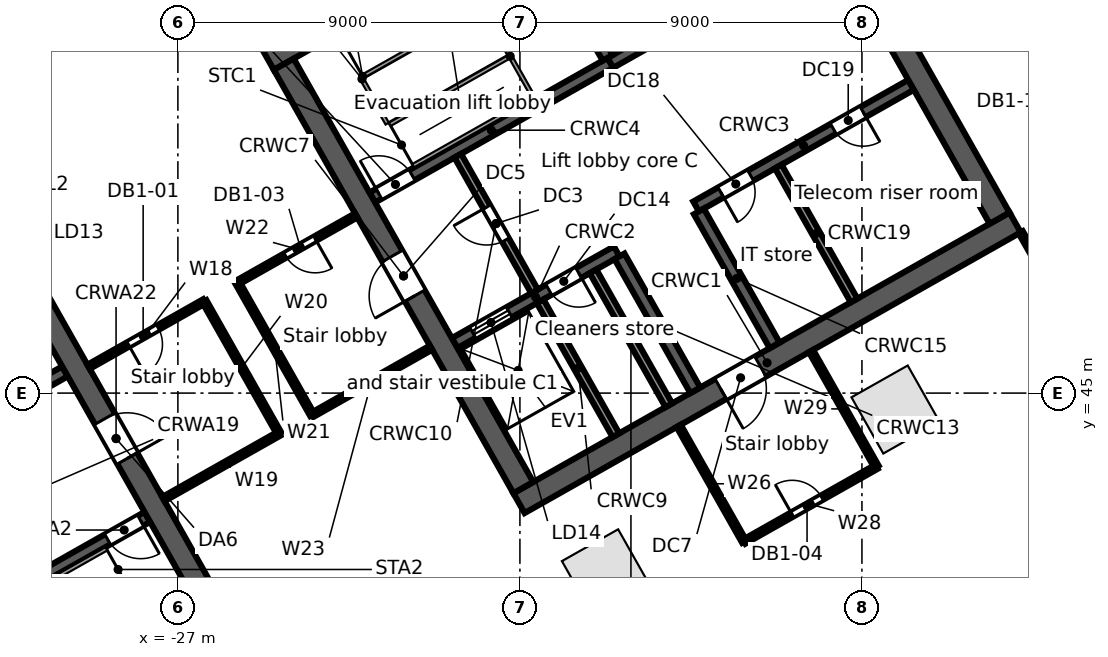
"""IFC4 building model, lengths in metres.
Left out: names, types, materials, properties, quantities, classifications, styles, units other than length and angle.
Written with IfcOpenShell. Run it as: python <this file> out.ifc"""

import sys

from ifc_helpers import new_model, si_unit, direction, frame, frame_2d, origin, origin_2d, place, context, subcontext, project, spatial, rectangle, extrude, element, fill, save


model = new_model("IFC4")
c1 = context("Model", 3, precision=1e-05, world=origin(), true_north=direction((0.0, 1.0)))
c2 = subcontext(c1, "Body", "Model", "MODEL_VIEW")
j1 = project(units=[si_unit("LENGTHUNIT", "METRE"), si_unit("PLANEANGLEUNIT", "RADIAN")], contexts=[c1])
p1 = place(None, origin())
s1 = spatial("IfcSite", under=j1, at=p1, CompositionType="ELEMENT")
p2 = place(p1, origin())
s2 = spatial("IfcBuilding", under=s1, at=p2, CompositionType="ELEMENT")
p3 = place(p2, frame((0.0, 0.0, -4.8)))
s3 = spatial("IfcBuildingStorey", under=s2, at=p3, CompositionType="ELEMENT", Elevation=-4.8)
p4 = place(p3, frame((-5.971, 78.503, 0.0), z_axis=(0.0, 0.0, 1.0), x_axis=(-0.870356741611, -0.492421711882, 0.0)))
e1 = element("IfcWall", 1, at=p4, inside=s3, PredefinedType="SOLIDWALL", context=c2, shape_type="SweptSolid", body=[
    extrude(rectangle(XDim=70.604, YDim=0.8, at=frame_2d((35.302, 0.0))), origin(), (0.0, 0.0, 1.0), 4.8),
])
for number, where, z_axis, x_axis in (
    (2, (-15.736, 40.257, 0.0), (0.0, 0.0, 1.0), (0.87, 0.492, 0.0)),
    (3, (-8.117, 44.568, 0.0), (0.0, 0.0, 1.0), (0.87, 0.492, 0.0)),
):
    element("IfcColumn", number, at=place(p3, frame(where, z_axis=z_axis, x_axis=x_axis)), inside=s3, PredefinedType="COLUMN", context=c2, shape_type="SweptSolid", body=[
        extrude(rectangle(XDim=1.7, YDim=1.7, at=origin_2d()), origin(), (0.0, 0.0, 1.0), 4.8),
    ])
p5 = place(p3, frame((-34.245, 38.097, 0.0), z_axis=(0.0, 0.0, 1.0), x_axis=(0.870364910201, 0.492407273597, 0.0)))
e4 = element("IfcWall", 4, at=p5, inside=s3, PredefinedType="SOLIDWALL", context=c2, shape_type="SweptSolid", body=[
    extrude(rectangle(XDim=7.4, YDim=0.3, at=frame_2d((3.7, 0.0))), origin(), (0.0, 0.0, 1.0), 4.35),
])
p6 = place(p5, frame((6.2, 0.0, 0.0)))
e5 = element("IfcOpeningElement", 5, at=p6, cuts=e4, PredefinedType="OPENING", context=c2, shape_type="SweptSolid", body=[
    extrude(rectangle(XDim=1.0, YDim=2.1, at=frame_2d((0.5, 1.05))), frame((0.0, 0.16, 0.0), z_axis=(0.0, -1.0, 0.0), x_axis=(1.0, 0.0, 0.0)), (0.0, 0.0, 1.0), 0.32),
])
p7 = place(p3, frame((-37.282, 41.435, 0.0), z_axis=(0.0, 0.0, 1.0), x_axis=(0.870356516133, 0.492422110414, 0.0)))
e6 = element("IfcWall", 6, at=p7, inside=s3, PredefinedType="SOLIDWALL", context=c2, shape_type="SweptSolid", body=[
    extrude(rectangle(XDim=8.4, YDim=0.3, at=frame_2d((4.2, 0.0))), origin(), (0.0, 0.0, 1.0), 4.35),
])
p8 = place(p7, frame((6.2, 0.0, 0.0)))
e7 = element("IfcOpeningElement", 7, at=p8, cuts=e6, PredefinedType="OPENING", context=c2, shape_type="SweptSolid", body=[
    extrude(rectangle(XDim=1.1, YDim=2.1, at=frame_2d((0.55, 1.05))), frame((0.0, 0.16, 0.0), z_axis=(0.0, -1.0, 0.0), x_axis=(1.0, 0.0, 0.0)), (0.0, 0.0, 1.0), 0.32),
])
p9 = place(p7, frame((1.55, 0.0, 0.0)))
e8 = element("IfcOpeningElement", 8, at=p9, cuts=e6, PredefinedType="OPENING", context=c2, shape_type="SweptSolid", body=[
    extrude(rectangle(XDim=0.9, YDim=2.1, at=frame_2d((0.45, 1.05))), frame((0.0, 0.16, 0.0), z_axis=(0.0, -1.0, 0.0), x_axis=(1.0, 0.0, 0.0)), (0.0, 0.0, 1.0), 0.32),
])
p10 = place(p3, frame((-31.778, 49.374, 0.0), z_axis=(0.0, 0.0, 1.0), x_axis=(0.492433046652, -0.870350328641, 0.0)))
e9 = element("IfcWall", 9, at=p10, inside=s3, PredefinedType="SOLIDWALL", context=c2, shape_type="SweptSolid", body=[
    extrude(rectangle(XDim=12.8, YDim=0.6, at=frame_2d((6.4, 0.0))), origin(), (0.0, 0.0, 1.0), 4.35),
])
p11 = place(p10, frame((5.8, 0.0, 0.0)))
e10 = element("IfcOpeningElement", 10, at=p11, cuts=e9, PredefinedType="OPENING", context=c2, shape_type="SweptSolid", body=[
    extrude(rectangle(XDim=1.2, YDim=2.1, at=frame_2d((0.6, 1.05))), frame((0.0, 0.31, 0.0), z_axis=(0.0, -1.0, 0.0), x_axis=(1.0, 0.0, 0.0)), (0.0, 0.0, 1.0), 0.62),
])
p12 = place(p3, frame((-18.024, 42.104, 0.0), z_axis=(0.0, 0.0, 1.0), x_axis=(0.870360574057, 0.492414937962, 0.0)))
e11 = element("IfcWall", 11, at=p12, inside=s3, PredefinedType="SOLIDWALL", context=c2, shape_type="SweptSolid", body=[
    extrude(rectangle(XDim=15.0, YDim=0.6, at=frame_2d((7.5, 0.0))), origin(), (0.0, 0.0, 1.0), 4.35),
])
p13 = place(p12, frame((6.1, 0.0, 0.0)))
e12 = element("IfcOpeningElement", 12, at=p13, cuts=e11, PredefinedType="OPENING", context=c2, shape_type="SweptSolid", body=[
    extrude(rectangle(XDim=1.2, YDim=2.1, at=frame_2d((0.6, 1.05))), frame((0.0, 0.31, 0.0), z_axis=(0.0, -1.0, 0.0), x_axis=(1.0, 0.0, 0.0)), (0.0, 0.0, 1.0), 0.62),
])
p14 = place(p3, frame((-19.718, 46.316, 0.0), z_axis=(0.0, 0.0, 1.0), x_axis=(0.870353963862, 0.492426621528, 0.0)))
e13 = element("IfcWall", 13, at=p14, inside=s3, PredefinedType="SOLIDWALL", context=c2, shape_type="SweptSolid", body=[
    extrude(rectangle(XDim=4.9, YDim=0.3, at=frame_2d((2.45, 0.0))), origin(), (0.0, 0.0, 1.0), 4.35),
])
p15 = place(p14, frame((0.55, 0.0, 0.0)))
e14 = element("IfcOpeningElement", 14, at=p15, cuts=e13, PredefinedType="OPENING", context=c2, shape_type="SweptSolid", body=[
    extrude(rectangle(XDim=1.1, YDim=2.1, at=frame_2d((0.55, 1.05))), frame((0.0, 0.16, 0.0), z_axis=(0.0, -1.0, 0.0), x_axis=(1.0, 0.0, 0.0)), (0.0, 0.0, 1.0), 0.32),
])
p16 = place(p14, frame((2.85, 0.0, 0.0)))
e15 = element("IfcOpeningElement", 15, at=p16, cuts=e13, PredefinedType="OPENING", context=c2, shape_type="SweptSolid", body=[
    extrude(rectangle(XDim=0.9, YDim=2.1, at=frame_2d((0.45, 1.05))), frame((0.0, 0.16, 0.0), z_axis=(0.0, -1.0, 0.0), x_axis=(1.0, 0.0, 0.0)), (0.0, 0.0, 1.0), 0.32),
])
p17 = place(p3, frame((-13.365, 49.911, 0.0), z_axis=(0.0, 0.0, 1.0), x_axis=(0.870340995471, 0.49244954219, 0.0)))
e16 = element("IfcWall", 16, at=p17, inside=s3, PredefinedType="SOLIDWALL", context=c2, shape_type="SweptSolid", body=[
    extrude(rectangle(XDim=6.5, YDim=0.3, at=frame_2d((3.25, 0.0))), origin(), (0.0, 0.0, 1.0), 4.35),
])
p18 = place(p17, frame((0.75, 0.0, 0.0)))
e17 = element("IfcOpeningElement", 17, at=p18, cuts=e16, PredefinedType="OPENING", context=c2, shape_type="SweptSolid", body=[
    extrude(rectangle(XDim=0.9, YDim=2.1, at=frame_2d((0.45, 1.05))), frame((0.0, 0.16, 0.0), z_axis=(0.0, -1.0, 0.0), x_axis=(1.0, 0.0, 0.0)), (0.0, 0.0, 1.0), 0.32),
])
p19 = place(p17, frame((4.15, 0.0, 0.0)))
e18 = element("IfcOpeningElement", 18, at=p19, cuts=e16, PredefinedType="OPENING", context=c2, shape_type="SweptSolid", body=[
    extrude(rectangle(XDim=0.9, YDim=2.1, at=frame_2d((0.45, 1.05))), frame((0.0, 0.16, 0.0), z_axis=(0.0, -1.0, 0.0), x_axis=(1.0, 0.0, 0.0)), (0.0, 0.0, 1.0), 0.32),
])
p20 = place(p3, frame((-21.885, 50.146, 0.0), z_axis=(0.0, 0.0, 1.0), x_axis=(0.870359411463, 0.492416992881, 0.0)))
e19 = element("IfcWall", 19, at=p20, inside=s3, PredefinedType="SOLIDWALL", context=c2, shape_type="SweptSolid", body=[
    extrude(rectangle(XDim=7.2, YDim=0.3, at=frame_2d((3.6, 0.0))), origin(), (0.0, 0.0, 1.0), 4.35),
])
p21 = place(p20, frame((0.2, 0.0, 0.0)))
e20 = element("IfcOpeningElement", 20, at=p21, cuts=e19, PredefinedType="OPENING", context=c2, shape_type="SweptSolid", body=[
    extrude(rectangle(XDim=1.0, YDim=2.1, at=frame_2d((0.5, 1.05))), frame((0.0, 0.16, 0.0), z_axis=(0.0, -1.0, 0.0), x_axis=(1.0, 0.0, 0.0)), (0.0, 0.0, 1.0), 0.32),
])
p22 = place(p3, frame((-15.618, 53.691, 0.0), z_axis=(0.0, 0.0, 1.0), x_axis=(0.870356769198, 0.492421663121, 0.0)))
e21 = element("IfcWall", 21, at=p22, inside=s3, PredefinedType="SOLIDWALL", context=c2, shape_type="SweptSolid", body=[
    extrude(rectangle(XDim=6.6, YDim=0.3, at=frame_2d((3.3, 0.0))), origin(), (0.0, 0.0, 1.0), 4.35),
])
p23 = place(p22, frame((2.6, 0.0, 0.0)))
e22 = element("IfcOpeningElement", 22, at=p23, cuts=e21, PredefinedType="OPENING", context=c2, shape_type="SweptSolid", body=[
    extrude(rectangle(XDim=0.9, YDim=2.1, at=frame_2d((0.45, 1.05))), frame((0.0, 0.16, 0.0), z_axis=(0.0, -1.0, 0.0), x_axis=(1.0, 0.0, 0.0)), (0.0, 0.0, 1.0), 0.32),
])
p24 = place(p3, frame((-24.623, 53.767, 0.0), z_axis=(0.0, 0.0, 1.0), x_axis=(0.870356627484, 0.492421913601, 0.0)))
e23 = element("IfcWall", 23, at=p24, inside=s3, PredefinedType="SOLIDWALL", context=c2, shape_type="SweptSolid", body=[
    extrude(rectangle(XDim=15.0, YDim=0.6, at=frame_2d((7.5, 0.0))), origin(), (0.0, 0.0, 1.0), 4.35),
])
p25 = place(p3, frame((-24.214, 53.654, 0.0), z_axis=(0.0, 0.0, 1.0), x_axis=(0.492441221355, -0.870345703448, 0.0)))
e24 = element("IfcWall", 24, at=p25, inside=s3, PredefinedType="SOLIDWALL", context=c2, shape_type="SweptSolid", body=[
    extrude(rectangle(XDim=12.8, YDim=0.6, at=frame_2d((6.4, 0.0))), origin(), (0.0, 0.0, 1.0), 4.35),
])
p26 = place(p25, frame((5.8, 0.0, 0.0)))
e25 = element("IfcOpeningElement", 25, at=p26, cuts=e24, PredefinedType="OPENING", context=c2, shape_type="SweptSolid", body=[
    extrude(rectangle(XDim=1.2, YDim=2.1, at=frame_2d((0.6, 1.05))), frame((0.0, 0.31, 0.0), z_axis=(0.0, -1.0, 0.0), x_axis=(1.0, 0.0, 0.0)), (0.0, 0.0, 1.0), 0.62),
])
p27 = place(p3, frame((-17.469, 47.417, 0.0), z_axis=(0.0, 0.0, 1.0), x_axis=(0.492440575896, -0.870346068648, 0.0)))
e26 = element("IfcWall", 26, at=p27, inside=s3, PredefinedType="SOLIDWALL", context=c2, shape_type="SweptSolid", body=[
    extrude(rectangle(XDim=4.05, YDim=0.2, at=frame_2d((2.025, 0.0))), origin(), (0.0, 0.0, 1.0), 4.35),
])
p28 = place(p3, frame((-19.635, 51.246, 0.0), z_axis=(0.0, 0.0, 1.0), x_axis=(0.492408451753, -0.87036424366, 0.0)))
e27 = element("IfcWall", 27, at=p28, inside=s3, PredefinedType="PARTITIONING", context=c2, shape_type="SweptSolid", body=[
    extrude(rectangle(XDim=4.1, YDim=0.2, at=frame_2d((2.05, 0.0))), origin(), (0.0, 0.0, 1.0), 4.35),
])
p29 = place(p28, frame((1.55, 0.0, 0.0)))
e28 = element("IfcOpeningElement", 28, at=p29, cuts=e27, PredefinedType="OPENING", context=c2, shape_type="SweptSolid", body=[
    extrude(rectangle(XDim=1.0, YDim=2.1, at=frame_2d((0.5, 1.05))), frame((0.0, 0.11, 0.0), z_axis=(0.0, -1.0, 0.0), x_axis=(1.0, 0.0, 0.0)), (0.0, 0.0, 1.0), 0.22),
])
p30 = place(p3, frame((-16.076, 48.205, 0.0), z_axis=(0.0, 0.0, 1.0), x_axis=(0.492394910396, -0.870371904542, 0.0)))
e29 = element("IfcWall", 29, at=p30, inside=s3, PredefinedType="SOLIDWALL", context=c2, shape_type="SweptSolid", body=[
    extrude(rectangle(XDim=4.05, YDim=0.2, at=frame_2d((2.025, 0.0))), origin(), (0.0, 0.0, 1.0), 4.35),
])
p31 = place(p3, frame((-15.379, 48.599, 0.0), z_axis=(0.0, 0.0, 1.0), x_axis=(0.492394910396, -0.870371904542, 0.0)))
e30 = element("IfcWall", 30, at=p31, inside=s3, PredefinedType="SOLIDWALL", context=c2, shape_type="SweptSolid", body=[
    extrude(rectangle(XDim=4.05, YDim=0.3, at=frame_2d((2.025, 0.0))), origin(), (0.0, 0.0, 1.0), 4.35),
])
p32 = place(p3, frame((-17.686, 57.347, 0.0), z_axis=(0.0, 0.0, 1.0), x_axis=(0.492420746998, -0.870357287513, 0.0)))
e31 = element("IfcWall", 31, at=p32, inside=s3, PredefinedType="SOLIDWALL", context=c2, shape_type="SweptSolid", body=[
    extrude(rectangle(XDim=4.05, YDim=0.3, at=frame_2d((2.025, 0.0))), origin(), (0.0, 0.0, 1.0), 4.35),
])
p33 = place(p3, frame((-13.291, 49.781, 0.0), z_axis=(0.0, 0.0, 1.0), x_axis=(0.492394910396, -0.870371904542, 0.0)))
e32 = element("IfcWall", 32, at=p33, inside=s3, PredefinedType="SOLIDWALL", context=c2, shape_type="SweptSolid", body=[
    extrude(rectangle(XDim=4.05, YDim=0.3, at=frame_2d((2.025, 0.0))), origin(), (0.0, 0.0, 1.0), 4.35),
])
p34 = place(p3, frame((-11.202, 50.962, 0.0), z_axis=(0.0, 0.0, 1.0), x_axis=(0.49241474071, -0.870360685654, 0.0)))
e33 = element("IfcWall", 33, at=p34, inside=s3, PredefinedType="PARTITIONING", context=c2, shape_type="SweptSolid", body=[
    extrude(rectangle(XDim=4.05, YDim=0.2, at=frame_2d((2.025, 0.0))), origin(), (0.0, 0.0, 1.0), 4.35),
])
p35 = place(p3, frame((-11.681, 60.744, 0.0), z_axis=(0.0, 0.0, 1.0), x_axis=(0.492426772896, -0.870353878221, 0.0)))
e34 = element("IfcWall", 34, at=p35, inside=s3, PredefinedType="SOLIDWALL", context=c2, shape_type="SweptSolid", body=[
    extrude(rectangle(XDim=12.8, YDim=0.6, at=frame_2d((6.4, 0.0))), origin(), (0.0, 0.0, 1.0), 4.35),
])
p36 = place(p3, frame((-29.35, 45.692, 0.0), z_axis=(0.0, 0.0, 1.0), x_axis=(0.870270394775, 0.492574298942, 0.0)))
e35 = element("IfcWall", 35, at=p36, inside=s3, PredefinedType="PARTITIONING", context=c2, shape_type="SweptSolid", body=[
    extrude(rectangle(XDim=3.5, YDim=0.125, at=frame_2d((1.75, 0.0))), origin(), (0.0, 0.0, 1.0), 4.35),
])
p37 = place(p36, frame((1.2, 0.0, 0.0)))
e36 = element("IfcOpeningElement", 36, at=p37, cuts=e35, PredefinedType="OPENING", context=c2, shape_type="SweptSolid", body=[
    extrude(rectangle(XDim=0.9, YDim=2.1, at=frame_2d((0.45, 1.05))), frame((0.0, 0.073, 0.0), z_axis=(0.0, -1.0, 0.0), x_axis=(1.0, 0.0, 0.0)), (0.0, 0.0, 1.0), 0.145),
])
p38 = place(p3, frame((-27.381, 42.211, 0.0), z_axis=(0.0, 0.0, 1.0), x_axis=(0.870457605386, 0.492243392262, 0.0)))
e37 = element("IfcWall", 37, at=p38, inside=s3, PredefinedType="PARTITIONING", context=c2, shape_type="SweptSolid", body=[
    extrude(rectangle(XDim=3.5, YDim=0.125, at=frame_2d((1.75, 0.0))), origin(), (0.0, 0.0, 1.0), 3.43),
])
p39 = place(p3, frame((-26.304, 47.416, 0.0), z_axis=(0.0, 0.0, 1.0), x_axis=(0.492421185685, -0.870357039317, 0.0)))
e38 = element("IfcWall", 38, at=p39, inside=s3, PredefinedType="PARTITIONING", context=c2, shape_type="SweptSolid", body=[
    extrude(rectangle(XDim=4.0, YDim=0.125, at=frame_2d((2.0, 0.0))), origin(), (0.0, 0.0, 1.0), 3.412),
])
p40 = place(p3, frame((-25.434, 47.908, 0.0), z_axis=(0.0, 0.0, 1.0), x_axis=(0.492525823506, -0.870297830159, 0.0)))
e39 = element("IfcWall", 39, at=p40, inside=s3, PredefinedType="PARTITIONING", context=c2, shape_type="SweptSolid", body=[
    extrude(rectangle(XDim=4.0, YDim=0.125, at=frame_2d((2.0, 0.0))), origin(), (0.0, 0.0, 1.0), 3.412),
])
p41 = place(p3, frame((-25.434, 47.908, 0.0), z_axis=(0.0, 0.0, 1.0), x_axis=(0.870352535776, 0.492429145632, 0.0)))
e40 = element("IfcWall", 40, at=p41, inside=s3, PredefinedType="PARTITIONING", context=c2, shape_type="SweptSolid", body=[
    extrude(rectangle(XDim=3.591, YDim=0.125, at=frame_2d((1.795, 0.0))), origin(), (0.0, 0.0, 1.0), 3.412),
])
p42 = place(p41, frame((1.45, 0.0, 0.0)))
e41 = element("IfcOpeningElement", 41, at=p42, cuts=e40, PredefinedType="OPENING", context=c2, shape_type="SweptSolid", body=[
    extrude(rectangle(XDim=0.9, YDim=2.1, at=frame_2d((0.45, 1.05))), frame((0.0, 0.073, 0.0), z_axis=(0.0, -1.0, 0.0), x_axis=(1.0, 0.0, 0.0)), (0.0, 0.0, 1.0), 0.145),
])
p43 = place(p3, frame((-23.464, 44.427, 0.0), z_axis=(0.0, 0.0, 1.0), x_axis=(0.870352535776, 0.492429145632, 0.0)))
e42 = element("IfcWall", 42, at=p43, inside=s3, PredefinedType="PARTITIONING", context=c2, shape_type="SweptSolid", body=[
    extrude(rectangle(XDim=3.591, YDim=0.125, at=frame_2d((1.795, 0.0))), origin(), (0.0, 0.0, 1.0), 4.35),
])
p44 = place(p3, frame((-13.822, 44.137, 0.0), z_axis=(0.0, 0.0, 1.0), x_axis=(0.492604200384, -0.870253469837, 0.0)))
e43 = element("IfcWall", 43, at=p44, inside=s3, PredefinedType="PARTITIONING", context=c2, shape_type="SweptSolid", body=[
    extrude(rectangle(XDim=3.5, YDim=0.125, at=frame_2d((1.75, 0.0))), origin(), (0.0, 0.0, 1.0), 3.63),
])
p45 = place(p3, frame((-12.098, 41.091, 0.0), z_axis=(0.0, 0.0, 1.0), x_axis=(0.870297830159, 0.492525823506, 0.0)))
e44 = element("IfcWall", 44, at=p45, inside=s3, PredefinedType="PARTITIONING", context=c2, shape_type="SweptSolid", body=[
    extrude(rectangle(XDim=4.0, YDim=0.125, at=frame_2d((2.0, 0.0))), origin(), (0.0, 0.0, 1.0), 3.724),
])
p46 = place(p45, frame((1.45, 0.0, 0.0)))
e45 = element("IfcOpeningElement", 45, at=p46, cuts=e44, PredefinedType="OPENING", context=c2, shape_type="SweptSolid", body=[
    extrude(rectangle(XDim=0.9, YDim=2.1, at=frame_2d((0.45, 1.05))), frame((0.0, 0.073, 0.0), z_axis=(0.0, -1.0, 0.0), x_axis=(1.0, 0.0, 0.0)), (0.0, 0.0, 1.0), 0.145),
])
p47 = place(p3, frame((-10.34, 46.107, 0.0), z_axis=(0.0, 0.0, 1.0), x_axis=(0.492392845909, -0.87037307248, 0.0)))
e46 = element("IfcWall", 46, at=p47, inside=s3, PredefinedType="PARTITIONING", context=c2, shape_type="SweptSolid", body=[
    extrude(rectangle(XDim=3.5, YDim=0.125, at=frame_2d((1.75, 0.0))), origin(), (0.0, 0.0, 1.0), 3.63),
])
p48 = place(p3, frame((-5.301, 57.001, 0.0), z_axis=(0.0, 0.0, 1.0), x_axis=(0.487215056149, -0.873282021492, 0.0)))
e47 = element("IfcWall", 47, at=p48, inside=s3, PredefinedType="PARTITIONING", context=c2, shape_type="SweptSolid", body=[
    extrude(rectangle(XDim=8.395, YDim=0.125, at=frame_2d((4.197, 0.0))), origin(), (0.0, 0.0, 1.0), 4.35),
])
p49 = place(p48, frame((3.7, 0.0, 0.0)))
e48 = element("IfcOpeningElement", 48, at=p49, cuts=e47, PredefinedType="OPENING", context=c2, shape_type="SweptSolid", body=[
    extrude(rectangle(XDim=0.9, YDim=2.1, at=frame_2d((0.45, 1.05))), frame((0.0, 0.073, 0.0), z_axis=(0.0, -1.0, 0.0), x_axis=(1.0, 0.0, 0.0)), (0.0, 0.0, 1.0), 0.145),
])
p50 = place(p3, frame((-4.821, 49.23, 0.0), z_axis=(0.0, 0.0, 1.0), x_axis=(0.494232133704, -0.869329970733, 0.0)))
e49 = element("IfcWall", 49, at=p50, inside=s3, PredefinedType="PARTITIONING", context=c2, shape_type="SweptSolid", body=[
    extrude(rectangle(XDim=9.755, YDim=0.125, at=frame_2d((4.877, 0.0))), origin(), (0.0, 0.0, 1.0), 3.63),
])
p51 = place(p6, frame((1.0, 0.0, 0.0), z_axis=(0.0, 0.0, 1.0), x_axis=(-1.0, 0.0, 0.0)))
e50 = element("IfcDoor", 50, at=p51, inside=s3, OperationType="SINGLE_SWING_LEFT", PredefinedType="DOOR", context=c2, shape_type="SweptSolid", body=[
    extrude(rectangle(XDim=1.0, YDim=2.1, at=frame_2d((0.5, 1.05))), frame((0.0, 0.025, 0.0), z_axis=(0.0, -1.0, 0.0), x_axis=(1.0, 0.0, 0.0)), (0.0, 0.0, 1.0), 0.05),
])
fill(e5, e50)
p52 = place(p11, origin())
e51 = element("IfcDoor", 51, at=p52, inside=s3, OperationType="SINGLE_SWING_RIGHT", PredefinedType="DOOR", context=c2, shape_type="SweptSolid", body=[
    extrude(rectangle(XDim=1.2, YDim=2.1, at=frame_2d((0.6, 1.05))), frame((0.0, 0.025, 0.0), z_axis=(0.0, -1.0, 0.0), x_axis=(1.0, 0.0, 0.0)), (0.0, 0.0, 1.0), 0.05),
])
fill(e10, e51)
p53 = place(p15, origin())
e52 = element("IfcDoor", 52, at=p53, inside=s3, OperationType="DOUBLE_DOOR_SLIDING", PredefinedType="DOOR", context=c2, shape_type="SweptSolid", body=[
    extrude(rectangle(XDim=1.1, YDim=2.1, at=frame_2d((0.55, 1.05))), frame((0.0, 0.025, 0.0), z_axis=(0.0, -1.0, 0.0), x_axis=(1.0, 0.0, 0.0)), (0.0, 0.0, 1.0), 0.05),
])
fill(e14, e52)
p54 = place(p21, origin())
e53 = element("IfcDoor", 53, at=p54, inside=s3, OperationType="SINGLE_SWING_LEFT", PredefinedType="DOOR", context=c2, shape_type="SweptSolid", body=[
    extrude(rectangle(XDim=1.0, YDim=2.1, at=frame_2d((0.5, 1.05))), frame((0.0, 0.025, 0.0), z_axis=(0.0, -1.0, 0.0), x_axis=(1.0, 0.0, 0.0)), (0.0, 0.0, 1.0), 0.05),
])
fill(e20, e53)
p55 = place(p29, frame((1.0, 0.0, 0.0), z_axis=(0.0, 0.0, 1.0), x_axis=(-1.0, 0.0, 0.0)))
e54 = element("IfcDoor", 54, at=p55, inside=s3, OperationType="SINGLE_SWING_RIGHT", PredefinedType="DOOR", context=c2, shape_type="SweptSolid", body=[
    extrude(rectangle(XDim=1.0, YDim=2.1, at=frame_2d((0.5, 1.05))), frame((0.0, 0.025, 0.0), z_axis=(0.0, -1.0, 0.0), x_axis=(1.0, 0.0, 0.0)), (0.0, 0.0, 1.0), 0.05),
])
fill(e28, e54)
p56 = place(p26, frame((1.2, 0.0, 0.0), z_axis=(0.0, 0.0, 1.0), x_axis=(-1.0, 0.0, 0.0)))
e55 = element("IfcDoor", 55, at=p56, inside=s3, OperationType="SINGLE_SWING_LEFT", PredefinedType="DOOR", context=c2, shape_type="SweptSolid", body=[
    extrude(rectangle(XDim=1.2, YDim=2.1, at=frame_2d((0.6, 1.05))), frame((0.0, 0.025, 0.0), z_axis=(0.0, -1.0, 0.0), x_axis=(1.0, 0.0, 0.0)), (0.0, 0.0, 1.0), 0.05),
])
fill(e25, e55)
p57 = place(p13, frame((1.2, 0.0, 0.0), z_axis=(0.0, 0.0, 1.0), x_axis=(-1.0, 0.0, 0.0)))
e56 = element("IfcDoor", 56, at=p57, inside=s3, OperationType="SINGLE_SWING_RIGHT", PredefinedType="DOOR", context=c2, shape_type="SweptSolid", body=[
    extrude(rectangle(XDim=1.2, YDim=2.1, at=frame_2d((0.6, 1.05))), frame((0.0, 0.025, 0.0), z_axis=(0.0, -1.0, 0.0), x_axis=(1.0, 0.0, 0.0)), (0.0, 0.0, 1.0), 0.05),
])
fill(e12, e56)
p58 = place(p16, frame((0.9, 0.0, 0.0), z_axis=(0.0, 0.0, 1.0), x_axis=(-1.0, 0.0, 0.0)))
e57 = element("IfcDoor", 57, at=p58, inside=s3, OperationType="SINGLE_SWING_LEFT", PredefinedType="DOOR", context=c2, shape_type="SweptSolid", body=[
    extrude(rectangle(XDim=0.9, YDim=2.1, at=frame_2d((0.45, 1.05))), frame((0.0, 0.025, 0.0), z_axis=(0.0, -1.0, 0.0), x_axis=(1.0, 0.0, 0.0)), (0.0, 0.0, 1.0), 0.05),
])
fill(e15, e57)
p59 = place(p18, frame((0.9, 0.0, 0.0), z_axis=(0.0, 0.0, 1.0), x_axis=(-1.0, 0.0, 0.0)))
e58 = element("IfcDoor", 58, at=p59, inside=s3, OperationType="SINGLE_SWING_RIGHT", PredefinedType="DOOR", context=c2, shape_type="SweptSolid", body=[
    extrude(rectangle(XDim=0.9, YDim=2.1, at=frame_2d((0.45, 1.05))), frame((0.0, 0.025, 0.0), z_axis=(0.0, -1.0, 0.0), x_axis=(1.0, 0.0, 0.0)), (0.0, 0.0, 1.0), 0.05),
])
fill(e17, e58)
p60 = place(p19, frame((0.9, 0.0, 0.0), z_axis=(0.0, 0.0, 1.0), x_axis=(-1.0, 0.0, 0.0)))
e59 = element("IfcDoor", 59, at=p60, inside=s3, OperationType="SINGLE_SWING_LEFT", PredefinedType="DOOR", context=c2, shape_type="SweptSolid", body=[
    extrude(rectangle(XDim=0.9, YDim=2.1, at=frame_2d((0.45, 1.05))), frame((0.0, 0.025, 0.0), z_axis=(0.0, -1.0, 0.0), x_axis=(1.0, 0.0, 0.0)), (0.0, 0.0, 1.0), 0.05),
])
fill(e18, e59)
p61 = place(p37, frame((0.9, 0.0, 0.0), z_axis=(0.0, 0.0, 1.0), x_axis=(-1.0, 0.0, 0.0)))
e60 = element("IfcDoor", 60, at=p61, inside=s3, OperationType="SINGLE_SWING_RIGHT", PredefinedType="DOOR", context=c2, shape_type="SweptSolid", body=[
    extrude(rectangle(XDim=0.9, YDim=2.1, at=frame_2d((0.45, 1.05))), frame((0.0, 0.025, 0.0), z_axis=(0.0, -1.0, 0.0), x_axis=(1.0, 0.0, 0.0)), (0.0, 0.0, 1.0), 0.05),
])
fill(e36, e60)
p62 = place(p42, frame((0.9, 0.0, 0.0), z_axis=(0.0, 0.0, 1.0), x_axis=(-1.0, 0.0, 0.0)))
e61 = element("IfcDoor", 61, at=p62, inside=s3, OperationType="SINGLE_SWING_LEFT", PredefinedType="DOOR", context=c2, shape_type="SweptSolid", body=[
    extrude(rectangle(XDim=0.9, YDim=2.1, at=frame_2d((0.45, 1.05))), frame((0.0, 0.025, 0.0), z_axis=(0.0, -1.0, 0.0), x_axis=(1.0, 0.0, 0.0)), (0.0, 0.0, 1.0), 0.05),
])
fill(e41, e61)
p63 = place(p46, origin())
e62 = element("IfcDoor", 62, at=p63, inside=s3, OperationType="SINGLE_SWING_LEFT", PredefinedType="DOOR", context=c2, shape_type="SweptSolid", body=[
    extrude(rectangle(XDim=0.9, YDim=2.1, at=frame_2d((0.45, 1.05))), frame((0.0, 0.025, 0.0), z_axis=(0.0, -1.0, 0.0), x_axis=(1.0, 0.0, 0.0)), (0.0, 0.0, 1.0), 0.05),
])
fill(e45, e62)
save(model, sys.argv[1])
